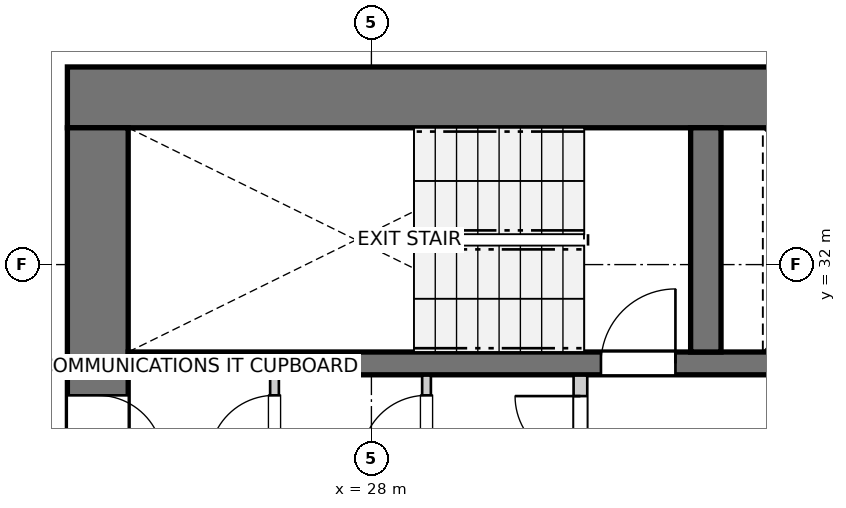
"""IFC4 building model, lengths in metres.
Left out: names, types, materials, properties, quantities, classifications, styles, units other than length and angle.
Written with IfcOpenShell. Run it as: python <this file> out.ifc"""

import sys

from ifc_helpers import new_model, si_unit, direction, frame, frame_2d, origin, place, context, subcontext, project, spatial, rectangle, extrude, source, transform, mapped, element, fill, save


model = new_model("IFC4")
c1 = context("Model", 3, precision=1e-05, world=origin(), true_north=direction((0.0, 1.0)))
c2 = subcontext(c1, "Body", "Model", "MODEL_VIEW")
j1 = project(units=[si_unit("LENGTHUNIT", "METRE"), si_unit("PLANEANGLEUNIT", "RADIAN")], contexts=[c1])
p1 = place(None, origin())
s1 = spatial("IfcSite", under=j1, at=p1, CompositionType="ELEMENT")
p2 = place(p1, origin())
s2 = spatial("IfcBuilding", under=s1, at=p2, CompositionType="ELEMENT")
p3 = place(p2, frame((0.0, 0.0, 30.2)))
s3 = spatial("IfcBuildingStorey", under=s2, at=p3, CompositionType="ELEMENT", Elevation=30.2)
p4 = place(p3, frame((36.7, 34.2, 0.0), z_axis=(0.0, 0.0, 1.0), x_axis=(-1.0, 0.0, 0.0)))
e1 = element("IfcWall", 1, at=p4, inside=s3, PredefinedType="SHEAR", context=c2, shape_type="SweptSolid", body=[
    extrude(rectangle(XDim=12.7, YDim=0.8, at=frame_2d((6.35, 0.0))), origin(), (0.0, 0.0, 1.0), 2.935),
])
p5 = place(p3, frame((24.4, 33.8, 0.0), z_axis=(0.0, 0.0, 1.0), x_axis=(0.0, -1.0, 0.0)))
e2 = element("IfcWall", 2, at=p5, inside=s3, PredefinedType="SHEAR", context=c2, shape_type="SweptSolid", body=[
    extrude(rectangle(XDim=15.6, YDim=0.8, at=frame_2d((7.8, 0.0))), origin(), (0.0, 0.0, 1.0), 2.935),
])
p6 = place(p5, frame((7.05, 0.0, 0.0)))
e3 = element("IfcOpeningElement", 3, at=p6, cuts=e2, PredefinedType="OPENING", context=c2, shape_type="SweptSolid", body=[
    extrude(rectangle(XDim=1.5, YDim=2.15, at=frame_2d((0.75, 1.075))), frame((0.0, 0.41, 0.0), z_axis=(0.0, -1.0, 0.0), x_axis=(1.0, 0.0, 0.0)), (0.0, 0.0, 1.0), 0.82),
])
p7 = place(p5, frame((3.52, 0.0, 0.0)))
e4 = element("IfcOpeningElement", 4, at=p7, cuts=e2, PredefinedType="OPENING", context=c2, shape_type="SweptSolid", body=[
    extrude(rectangle(XDim=0.86, YDim=2.05, at=frame_2d((0.43, 1.025))), frame((0.0, 0.41, 0.0), z_axis=(0.0, -1.0, 0.0), x_axis=(1.0, 0.0, 0.0)), (0.0, 0.0, 1.0), 0.82),
])
p8 = place(p5, frame((11.22, 0.0, 0.0)))
e5 = element("IfcOpeningElement", 5, at=p8, cuts=e2, PredefinedType="OPENING", context=c2, shape_type="SweptSolid", body=[
    extrude(rectangle(XDim=0.86, YDim=2.05, at=frame_2d((0.43, 1.025))), frame((0.0, 0.41, 0.0), z_axis=(0.0, -1.0, 0.0), x_axis=(1.0, 0.0, 0.0)), (0.0, 0.0, 1.0), 0.82),
])
p9 = place(p3, frame((24.8, 30.7, 0.0), z_axis=(0.0, 0.0, 1.0), x_axis=(1.0, 0.0, 0.0)))
e6 = element("IfcWall", 6, at=p9, inside=s3, PredefinedType="SHEAR", context=c2, shape_type="SweptSolid", body=[
    extrude(rectangle(XDim=11.1, YDim=0.3, at=frame_2d((5.55, 0.0))), origin(), (0.0, 0.0, 1.0), 2.935),
])
p10 = place(p9, frame((6.22, 0.0, 0.0)))
e7 = element("IfcOpeningElement", 7, at=p10, cuts=e6, PredefinedType="OPENING", context=c2, shape_type="SweptSolid", body=[
    extrude(rectangle(XDim=0.98, YDim=2.15, at=frame_2d((0.49, 1.075))), frame((0.0, 0.16, 0.0), z_axis=(0.0, -1.0, 0.0), x_axis=(1.0, 0.0, 0.0)), (0.0, 0.0, 1.0), 0.32),
])
p11 = place(p9, frame((9.15, 0.0, 0.0)))
e8 = element("IfcOpeningElement", 8, at=p11, cuts=e6, PredefinedType="OPENING", context=c2, shape_type="SweptSolid", body=[
    extrude(rectangle(XDim=1.15, YDim=2.15, at=frame_2d((0.575, 1.075))), frame((0.0, 0.16, 0.0), z_axis=(0.0, -1.0, 0.0), x_axis=(1.0, 0.0, 0.0)), (0.0, 0.0, 1.0), 0.32),
])
p12 = place(p3, frame((32.4, 30.85, 0.0), z_axis=(0.0, 0.0, 1.0), x_axis=(0.0, 1.0, 0.0)))
e9 = element("IfcWall", 9, at=p12, inside=s3, PredefinedType="SHEAR", context=c2, shape_type="SweptSolid", body=[
    extrude(rectangle(XDim=2.95, YDim=0.4, at=frame_2d((1.475, 0.0))), origin(), (0.0, 0.0, 1.0), 2.935),
])
p13 = place(p3, frame((30.75, 27.43, 0.0), z_axis=(0.0, 0.0, 1.0), x_axis=(0.0, 1.0, 0.0)))
e10 = element("IfcWall", 10, at=p13, inside=s3, PredefinedType="PARTITIONING", context=c2, shape_type="SweptSolid", body=[
    extrude(rectangle(XDim=3.11, YDim=0.18, at=frame_2d((1.555, 0.0))), origin(), (0.0, 0.0, 1.0), 2.935),
])
p14 = place(p13, frame((1.98, 0.0, 0.0)))
e11 = element("IfcOpeningElement", 11, at=p14, cuts=e10, PredefinedType="OPENING", context=c2, shape_type="SweptSolid", body=[
    extrude(rectangle(XDim=0.86, YDim=2.05, at=frame_2d((0.43, 1.025))), frame((0.0, 0.1, 0.0), z_axis=(0.0, -1.0, 0.0), x_axis=(1.0, 0.0, 0.0)), (0.0, 0.0, 1.0), 0.2),
])
p15 = place(p3, frame((26.725, 29.16, 0.0), z_axis=(0.0, 0.0, 1.0), x_axis=(0.0, 1.0, 0.0)))
e12 = element("IfcWall", 12, at=p15, inside=s3, PredefinedType="PARTITIONING", context=c2, shape_type="SweptSolid", body=[
    extrude(rectangle(XDim=1.38, YDim=0.115, at=frame_2d((0.69, 0.0))), origin(), (0.0, 0.0, 1.0), 2.935),
])
p16 = place(p15, frame((0.26, 0.0, 0.0)))
e13 = element("IfcOpeningElement", 13, at=p16, cuts=e12, PredefinedType="OPENING", context=c2, shape_type="SweptSolid", body=[
    extrude(rectangle(XDim=0.86, YDim=2.05, at=frame_2d((0.43, 1.025))), frame((0.0, 0.067, 0.0), z_axis=(0.0, -1.0, 0.0), x_axis=(1.0, 0.0, 0.0)), (0.0, 0.0, 1.0), 0.135),
])
p17 = place(p3, frame((28.725, 29.16, 0.0), z_axis=(0.0, 0.0, 1.0), x_axis=(0.0, 1.0, 0.0)))
e14 = element("IfcWall", 14, at=p17, inside=s3, PredefinedType="PARTITIONING", context=c2, shape_type="SweptSolid", body=[
    extrude(rectangle(XDim=1.38, YDim=0.115, at=frame_2d((0.69, 0.0))), origin(), (0.0, 0.0, 1.0), 2.935),
])
p18 = place(p17, frame((0.26, 0.0, 0.0)))
e15 = element("IfcOpeningElement", 15, at=p18, cuts=e14, PredefinedType="OPENING", context=c2, shape_type="SweptSolid", body=[
    extrude(rectangle(XDim=0.86, YDim=2.05, at=frame_2d((0.43, 1.025))), frame((0.0, 0.067, 0.0), z_axis=(0.0, -1.0, 0.0), x_axis=(1.0, 0.0, 0.0)), (0.0, 0.0, 1.0), 0.135),
])
m1 = source(origin(), c2, "Body", "SweptSolid", [
    extrude(rectangle(XDim=0.98, YDim=2.15, at=frame_2d((0.49, 1.075))), frame((0.0, 0.025, 0.0), z_axis=(0.0, -1.0, 0.0), x_axis=(1.0, 0.0, 0.0)), (0.0, 0.0, 1.0), 0.05),
])
p19 = place(p10, origin())
e16 = element("IfcDoor", 16, at=p19, inside=s3, OperationType="SINGLE_SWING_RIGHT", PredefinedType="DOOR", context=c2, shape_type="MappedRepresentation", body=[
    mapped(m1, transform((0.0, 0.0, 0.0), x_axis=(1.0, 0.0, 0.0), y_axis=(0.0, 1.0, 0.0), z_axis=(0.0, 0.0, 1.0), scale=1.0)),
])
fill(e7, e16)
m2 = source(origin(), c2, "Body", "SweptSolid", [
    extrude(rectangle(XDim=0.86, YDim=2.05, at=frame_2d((0.43, 1.025))), frame((0.0, 0.025, 0.0), z_axis=(0.0, -1.0, 0.0), x_axis=(1.0, 0.0, 0.0)), (0.0, 0.0, 1.0), 0.05),
])
p20 = place(p7, origin())
e17 = element("IfcDoor", 17, at=p20, inside=s3, OperationType="SINGLE_SWING_RIGHT", PredefinedType="DOOR", context=c2, shape_type="MappedRepresentation", body=[
    mapped(m2, transform((0.0, 0.0, 0.0), x_axis=(1.0, 0.0, 0.0), y_axis=(0.0, 1.0, 0.0), z_axis=(0.0, 0.0, 1.0), scale=1.0)),
])
fill(e4, e17)
p21 = place(p14, origin())
e18 = element("IfcDoor", 18, at=p21, inside=s3, OperationType="SINGLE_SWING_RIGHT", PredefinedType="DOOR", context=c2, shape_type="MappedRepresentation", body=[
    mapped(m2, transform((0.0, 0.0, 0.0), x_axis=(1.0, 0.0, 0.0), y_axis=(0.0, 1.0, 0.0), z_axis=(0.0, 0.0, 1.0), scale=1.0)),
])
fill(e11, e18)
p22 = place(p16, origin())
e19 = element("IfcDoor", 19, at=p22, inside=s3, OperationType="SINGLE_SWING_LEFT", PredefinedType="DOOR", context=c2, shape_type="MappedRepresentation", body=[
    mapped(m2, transform((0.0, 0.0, 0.0), x_axis=(1.0, 0.0, 0.0), y_axis=(0.0, 1.0, 0.0), z_axis=(0.0, 0.0, 1.0), scale=1.0)),
])
fill(e13, e19)
p23 = place(p18, origin())
e20 = element("IfcDoor", 20, at=p23, inside=s3, OperationType="SINGLE_SWING_LEFT", PredefinedType="DOOR", context=c2, shape_type="MappedRepresentation", body=[
    mapped(m2, transform((0.0, 0.0, 0.0), x_axis=(1.0, 0.0, 0.0), y_axis=(0.0, 1.0, 0.0), z_axis=(0.0, 0.0, 1.0), scale=1.0)),
])
fill(e15, e20)
save(model, sys.argv[1])
